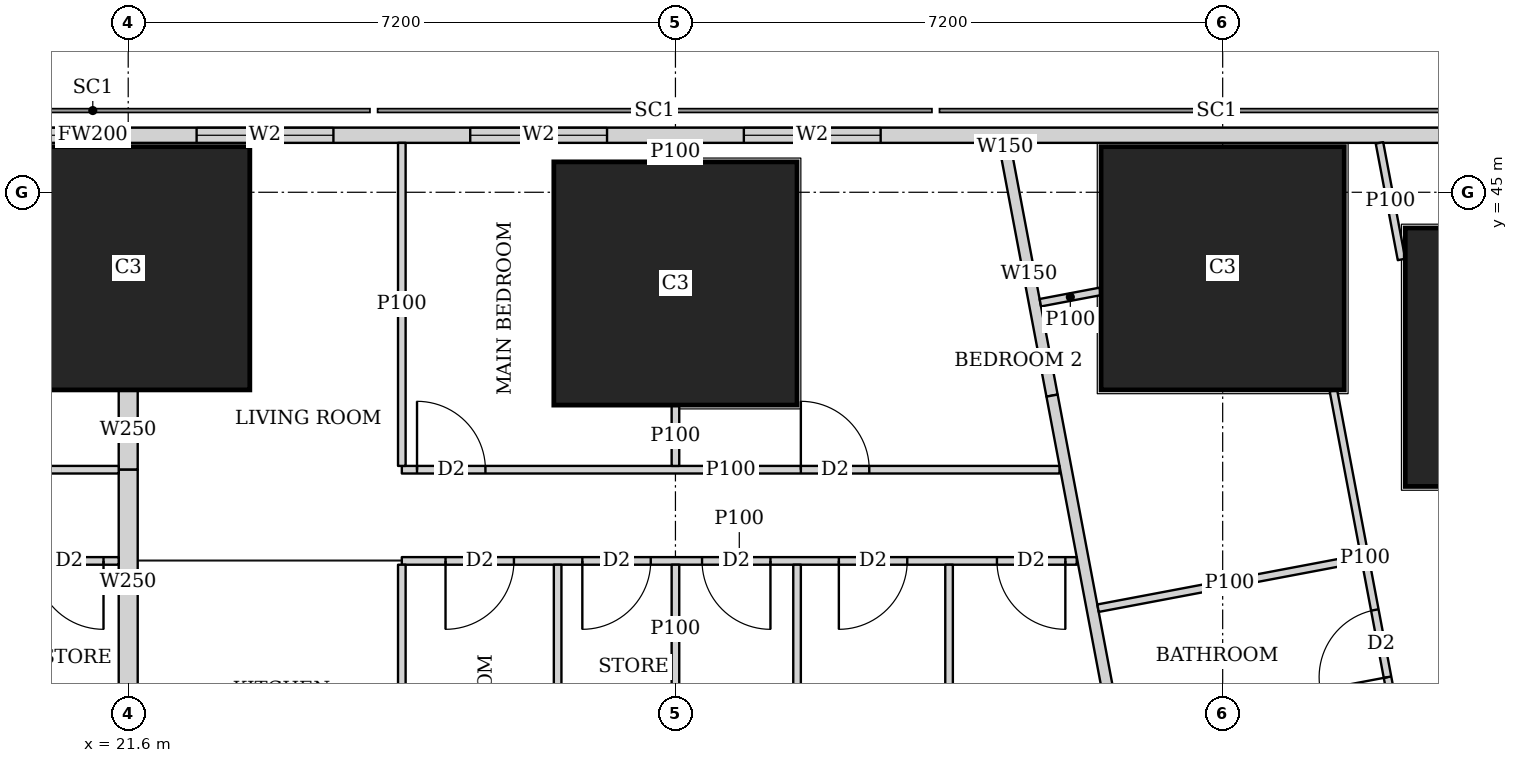
"""IFC4 building model, lengths in metres.
Left out: names, types, materials, properties, quantities, classifications, styles, units other than length and angle.
Written with IfcOpenShell. Run it as: python <this file> out.ifc"""

import sys

from ifc_helpers import new_model, si_unit, direction, frame, frame_2d, origin, origin_2d, place, context, subcontext, project, spatial, rectangle, extrude, element, fill, save


model = new_model("IFC4")
c1 = context("Model", 3, precision=1e-05, world=origin(), true_north=direction((0.0, 1.0)))
c2 = subcontext(c1, "Body", "Model", "MODEL_VIEW")
j1 = project(units=[si_unit("LENGTHUNIT", "METRE"), si_unit("PLANEANGLEUNIT", "RADIAN")], contexts=[c1])
p1 = place(None, origin())
s1 = spatial("IfcSite", under=j1, at=p1, CompositionType="ELEMENT")
p2 = place(p1, origin())
s2 = spatial("IfcBuilding", under=s1, at=p2, CompositionType="ELEMENT")
p3 = place(p2, frame((0.0, 0.0, 23.75)))
s3 = spatial("IfcBuildingStorey", under=s2, at=p3, CompositionType="ELEMENT", Elevation=23.75)
p4 = place(p3, frame((40.102, 42.83, 0.0), z_axis=(0.0, 0.0, 1.0), x_axis=(1.0, 0.0, 0.0)))
e1 = element("IfcColumn", 1, at=p4, inside=s3, PredefinedType="COLUMN", context=c2, shape_type="SweptSolid", body=[
    extrude(rectangle(XDim=3.4, YDim=3.4, at=origin_2d()), origin(), (0.0, 0.0, 1.0), 3.75),
])
for number, where, z_axis, x_axis in (
    (2, (21.6, 44.0, 0.0), (0.0, 0.0, 1.0), (1.0, 0.0, 0.0)),
    (3, (28.8, 43.8, 0.0), (0.0, 0.0, 1.0), (1.0, 0.0, 0.0)),
    (4, (36.0, 44.0, 0.0), (0.0, 0.0, 1.0), (1.0, 0.0, 0.0)),
):
    element("IfcColumn", number, at=place(p3, frame(where, z_axis=z_axis, x_axis=x_axis)), inside=s3, PredefinedType="COLUMN", context=c2, shape_type="SweptSolid", body=[
        extrude(rectangle(XDim=3.2, YDim=3.2, at=origin_2d()), origin(), (0.0, 0.0, 1.0), 3.75),
    ])
p5 = place(p3, frame((40.106, 45.75, 0.0), z_axis=(0.0, 0.0, 1.0), x_axis=(-1.0, 0.0, 0.0)))
e5 = element("IfcWall", 5, at=p5, inside=s3, PredefinedType="SOLIDWALL", context=c2, shape_type="SweptSolid", body=[
    extrude(rectangle(XDim=37.943, YDim=0.2, at=frame_2d((18.971, 0.0))), origin(), (0.0, 0.0, 1.0), 3.5),
])
p6 = place(p5, frame((8.606, 0.0, 0.9)))
e6 = element("IfcOpeningElement", 6, at=p6, cuts=e5, PredefinedType="OPENING", context=c2, shape_type="SweptSolid", body=[
    extrude(rectangle(XDim=1.8, YDim=1.5, at=frame_2d((0.9, 0.75))), frame((0.0, 0.11, 0.0), z_axis=(0.0, -1.0, 0.0), x_axis=(1.0, 0.0, 0.0)), (0.0, 0.0, 1.0), 0.22),
])
p7 = place(p5, frame((12.206, 0.0, 0.9)))
e7 = element("IfcOpeningElement", 7, at=p7, cuts=e5, PredefinedType="OPENING", context=c2, shape_type="SweptSolid", body=[
    extrude(rectangle(XDim=1.8, YDim=1.5, at=frame_2d((0.9, 0.75))), frame((0.0, 0.11, 0.0), z_axis=(0.0, -1.0, 0.0), x_axis=(1.0, 0.0, 0.0)), (0.0, 0.0, 1.0), 0.22),
])
p8 = place(p5, frame((15.806, 0.0, 0.9)))
e8 = element("IfcOpeningElement", 8, at=p8, cuts=e5, PredefinedType="OPENING", context=c2, shape_type="SweptSolid", body=[
    extrude(rectangle(XDim=1.8, YDim=1.5, at=frame_2d((0.9, 0.75))), frame((0.0, 0.11, 0.0), z_axis=(0.0, -1.0, 0.0), x_axis=(1.0, 0.0, 0.0)), (0.0, 0.0, 1.0), 0.22),
])
p9 = place(p5, frame((19.406, 0.0, 0.9)))
e9 = element("IfcOpeningElement", 9, at=p9, cuts=e5, PredefinedType="OPENING", context=c2, shape_type="SweptSolid", body=[
    extrude(rectangle(XDim=1.8, YDim=1.5, at=frame_2d((0.9, 0.75))), frame((0.0, 0.11, 0.0), z_axis=(0.0, -1.0, 0.0), x_axis=(1.0, 0.0, 0.0)), (0.0, 0.0, 1.0), 0.22),
])
p10 = place(p5, frame((23.006, 0.0, 0.9)))
e10 = element("IfcOpeningElement", 10, at=p10, cuts=e5, PredefinedType="OPENING", context=c2, shape_type="SweptSolid", body=[
    extrude(rectangle(XDim=1.8, YDim=1.5, at=frame_2d((0.9, 0.75))), frame((0.0, 0.11, 0.0), z_axis=(0.0, -1.0, 0.0), x_axis=(1.0, 0.0, 0.0)), (0.0, 0.0, 1.0), 0.22),
])
p11 = place(p5, frame((26.606, 0.0, 0.9)))
e11 = element("IfcOpeningElement", 11, at=p11, cuts=e5, PredefinedType="OPENING", context=c2, shape_type="SweptSolid", body=[
    extrude(rectangle(XDim=1.8, YDim=1.5, at=frame_2d((0.9, 0.75))), frame((0.0, 0.11, 0.0), z_axis=(0.0, -1.0, 0.0), x_axis=(1.0, 0.0, 0.0)), (0.0, 0.0, 1.0), 0.22),
])
p12 = place(p3, frame((33.127, 45.65, 0.0), z_axis=(0.0, 0.0, 1.0), x_axis=(0.184660164975, -0.98280243359, 0.0)))
e12 = element("IfcWall", 12, at=p12, inside=s3, PredefinedType="SOLIDWALL", context=c2, shape_type="SweptSolid", body=[
    extrude(rectangle(XDim=0.119, YDim=0.15, at=frame_2d((0.06, 0.0))), origin(), (0.0, 0.0, 1.0), 3.5),
])
p13 = place(p3, frame((33.149, 45.533, 0.0), z_axis=(0.0, 0.0, 1.0), x_axis=(0.185606774758, -0.98262410166, 0.0)))
e13 = element("IfcWall", 13, at=p13, inside=s3, PredefinedType="SOLIDWALL", context=c2, shape_type="SweptSolid", body=[
    extrude(rectangle(XDim=3.265, YDim=0.15, at=frame_2d((1.632, 0.0))), origin(), (0.0, 0.0, 1.0), 2.05),
])
p14 = place(p3, frame((33.755, 42.325, 0.0), z_axis=(0.0, 0.0, 1.0), x_axis=(0.185611461091, -0.982623216453, 0.0)))
e14 = element("IfcWall", 14, at=p14, inside=s3, PredefinedType="SOLIDWALL", context=c2, shape_type="SweptSolid", body=[
    extrude(rectangle(XDim=40.241, YDim=0.15, at=frame_2d((20.121, 0.0))), origin(), (0.0, 0.0, 1.0), 2.5),
])
p15 = place(p14, frame((7.325, 0.0, 0.0)))
e15 = element("IfcOpeningElement", 15, at=p15, cuts=e14, PredefinedType="OPENING", context=c2, shape_type="SweptSolid", body=[
    extrude(rectangle(XDim=1.0, YDim=2.1, at=frame_2d((0.5, 1.05))), frame((0.0, 0.085, 0.0), z_axis=(0.0, -1.0, 0.0), x_axis=(1.0, 0.0, 0.0)), (0.0, 0.0, 1.0), 0.17),
])
p16 = place(p14, frame((11.902, 0.0, 0.0)))
e16 = element("IfcOpeningElement", 16, at=p16, cuts=e14, PredefinedType="OPENING", context=c2, shape_type="SweptSolid", body=[
    extrude(rectangle(XDim=1.0, YDim=2.1, at=frame_2d((0.5, 1.05))), frame((0.0, 0.085, 0.0), z_axis=(0.0, -1.0, 0.0), x_axis=(1.0, 0.0, 0.0)), (0.0, 0.0, 1.0), 0.17),
])
p17 = place(p14, frame((25.718, 0.0, 0.0)))
e17 = element("IfcOpeningElement", 17, at=p17, cuts=e14, PredefinedType="OPENING", context=c2, shape_type="SweptSolid", body=[
    extrude(rectangle(XDim=1.0, YDim=2.1, at=frame_2d((0.5, 1.05))), frame((0.0, 0.085, 0.0), z_axis=(0.0, -1.0, 0.0), x_axis=(1.0, 0.0, 0.0)), (0.0, 0.0, 1.0), 0.17),
])
p18 = place(p14, frame((31.788, 0.0, 0.0)))
e18 = element("IfcOpeningElement", 18, at=p18, cuts=e14, PredefinedType="OPENING", context=c2, shape_type="SweptSolid", body=[
    extrude(rectangle(XDim=1.0, YDim=2.1, at=frame_2d((0.5, 1.05))), frame((0.0, 0.085, 0.0), z_axis=(0.0, -1.0, 0.0), x_axis=(1.0, 0.0, 0.0)), (0.0, 0.0, 1.0), 0.17),
])
p19 = place(p3, frame((38.063, 45.65, 0.0), z_axis=(0.0, 0.0, 1.0), x_axis=(0.185789650565, -0.982589540827, 0.0)))
e19 = element("IfcWall", 19, at=p19, inside=s3, PredefinedType="PARTITIONING", context=c2, shape_type="SweptSolid", body=[
    extrude(rectangle(XDim=1.561, YDim=0.1, at=frame_2d((0.781, 0.0))), origin(), (0.0, 0.0, 1.0), 3.5),
])
p20 = place(p3, frame((37.457, 42.39, 0.0), z_axis=(0.0, 0.0, 1.0), x_axis=(0.185560627322, -0.982632817276, 0.0)))
e20 = element("IfcWall", 20, at=p20, inside=s3, PredefinedType="PARTITIONING", context=c2, shape_type="SweptSolid", body=[
    extrude(rectangle(XDim=4.484, YDim=0.1, at=frame_2d((2.242, 0.0))), origin(), (0.0, 0.0, 1.0), 3.5),
])
p21 = place(p20, frame((2.936, 0.0, 0.0)))
e21 = element("IfcOpeningElement", 21, at=p21, cuts=e20, PredefinedType="OPENING", context=c2, shape_type="SweptSolid", body=[
    extrude(rectangle(XDim=0.9, YDim=2.1, at=frame_2d((0.45, 1.05))), frame((0.0, 0.06, 0.0), z_axis=(0.0, -1.0, 0.0), x_axis=(1.0, 0.0, 0.0)), (0.0, 0.0, 1.0), 0.12),
])
p22 = place(p3, frame((34.39, 43.696, 0.0), z_axis=(0.0, 0.0, 1.0), x_axis=(-0.982640737979, -0.185518678479, 0.0)))
e22 = element("IfcWall", 22, at=p22, inside=s3, PredefinedType="PARTITIONING", context=c2, shape_type="SweptSolid", body=[
    extrude(rectangle(XDim=0.803, YDim=0.1, at=frame_2d((0.401, 0.0))), origin(), (0.0, 0.0, 1.0), 2.05),
])
p23 = place(p3, frame((37.823, 40.182, 0.0), z_axis=(0.0, 0.0, 1.0), x_axis=(-0.98263926043, -0.185526504472, 0.0)))
e23 = element("IfcWall", 23, at=p23, inside=s3, PredefinedType="PARTITIONING", context=c2, shape_type="SweptSolid", body=[
    extrude(rectangle(XDim=3.524, YDim=0.1, at=frame_2d((1.762, 0.0))), origin(), (0.0, 0.0, 1.0), 3.5),
])
p24 = place(p3, frame((18.0, 41.35, 0.0), z_axis=(0.0, 0.0, 1.0), x_axis=(1.0, 0.0, 0.0)))
e24 = element("IfcWall", 24, at=p24, inside=s3, PredefinedType="PARTITIONING", context=c2, shape_type="SweptSolid", body=[
    extrude(rectangle(XDim=3.475, YDim=0.1, at=frame_2d((1.738, 0.0))), origin(), (0.0, 0.0, 1.0), 3.5),
])
p25 = place(p24, frame((0.2, 0.0, 0.0)))
e25 = element("IfcOpeningElement", 25, at=p25, cuts=e24, PredefinedType="OPENING", context=c2, shape_type="SweptSolid", body=[
    extrude(rectangle(XDim=0.9, YDim=2.1, at=frame_2d((0.45, 1.05))), frame((0.0, 0.06, 0.0), z_axis=(0.0, -1.0, 0.0), x_axis=(1.0, 0.0, 0.0)), (0.0, 0.0, 1.0), 0.12),
])
p26 = place(p3, frame((18.0, 40.15, 0.0), z_axis=(0.0, 0.0, 1.0), x_axis=(1.0, 0.0, 0.0)))
e26 = element("IfcWall", 26, at=p26, inside=s3, PredefinedType="PARTITIONING", context=c2, shape_type="SweptSolid", body=[
    extrude(rectangle(XDim=3.475, YDim=0.1, at=frame_2d((1.738, 0.0))), origin(), (0.0, 0.0, 1.0), 3.5),
])
p27 = place(p26, frame((0.575, 0.0, 0.0)))
e27 = element("IfcOpeningElement", 27, at=p27, cuts=e26, PredefinedType="OPENING", context=c2, shape_type="SweptSolid", body=[
    extrude(rectangle(XDim=0.9, YDim=2.1, at=frame_2d((0.45, 1.05))), frame((0.0, 0.06, 0.0), z_axis=(0.0, -1.0, 0.0), x_axis=(1.0, 0.0, 0.0)), (0.0, 0.0, 1.0), 0.12),
])
p28 = place(p26, frame((2.375, 0.0, 0.0)))
e28 = element("IfcOpeningElement", 28, at=p28, cuts=e26, PredefinedType="OPENING", context=c2, shape_type="SweptSolid", body=[
    extrude(rectangle(XDim=0.9, YDim=2.1, at=frame_2d((0.45, 1.05))), frame((0.0, 0.06, 0.0), z_axis=(0.0, -1.0, 0.0), x_axis=(1.0, 0.0, 0.0)), (0.0, 0.0, 1.0), 0.12),
])
p29 = place(p3, frame((25.2, 41.35, 0.0), z_axis=(0.0, 0.0, 1.0), x_axis=(1.0, 0.0, 0.0)))
e29 = element("IfcWall", 29, at=p29, inside=s3, PredefinedType="PARTITIONING", context=c2, shape_type="SweptSolid", body=[
    extrude(rectangle(XDim=8.653, YDim=0.1, at=frame_2d((4.327, 0.0))), origin(), (0.0, 0.0, 1.0), 3.5),
])
p30 = place(p29, frame((0.2, 0.0, 0.0)))
e30 = element("IfcOpeningElement", 30, at=p30, cuts=e29, PredefinedType="OPENING", context=c2, shape_type="SweptSolid", body=[
    extrude(rectangle(XDim=0.9, YDim=2.1, at=frame_2d((0.45, 1.05))), frame((0.0, 0.06, 0.0), z_axis=(0.0, -1.0, 0.0), x_axis=(1.0, 0.0, 0.0)), (0.0, 0.0, 1.0), 0.12),
])
p31 = place(p29, frame((5.25, 0.0, 0.0)))
e31 = element("IfcOpeningElement", 31, at=p31, cuts=e29, PredefinedType="OPENING", context=c2, shape_type="SweptSolid", body=[
    extrude(rectangle(XDim=0.9, YDim=2.1, at=frame_2d((0.45, 1.05))), frame((0.0, 0.06, 0.0), z_axis=(0.0, -1.0, 0.0), x_axis=(1.0, 0.0, 0.0)), (0.0, 0.0, 1.0), 0.12),
])
p32 = place(p3, frame((25.2, 40.15, 0.0), z_axis=(0.0, 0.0, 1.0), x_axis=(1.0, 0.0, 0.0)))
e32 = element("IfcWall", 32, at=p32, inside=s3, PredefinedType="PARTITIONING", context=c2, shape_type="SweptSolid", body=[
    extrude(rectangle(XDim=8.88, YDim=0.1, at=frame_2d((4.44, 0.0))), origin(), (0.0, 0.0, 1.0), 3.5),
])
p33 = place(p32, frame((0.575, 0.0, 0.0)))
e33 = element("IfcOpeningElement", 33, at=p33, cuts=e32, PredefinedType="OPENING", context=c2, shape_type="SweptSolid", body=[
    extrude(rectangle(XDim=0.9, YDim=2.1, at=frame_2d((0.45, 1.05))), frame((0.0, 0.06, 0.0), z_axis=(0.0, -1.0, 0.0), x_axis=(1.0, 0.0, 0.0)), (0.0, 0.0, 1.0), 0.12),
])
p34 = place(p32, frame((3.95, 0.0, 0.0)))
e34 = element("IfcOpeningElement", 34, at=p34, cuts=e32, PredefinedType="OPENING", context=c2, shape_type="SweptSolid", body=[
    extrude(rectangle(XDim=0.9, YDim=2.1, at=frame_2d((0.45, 1.05))), frame((0.0, 0.06, 0.0), z_axis=(0.0, -1.0, 0.0), x_axis=(1.0, 0.0, 0.0)), (0.0, 0.0, 1.0), 0.12),
])
p35 = place(p32, frame((7.83, 0.0, 0.0)))
e35 = element("IfcOpeningElement", 35, at=p35, cuts=e32, PredefinedType="OPENING", context=c2, shape_type="SweptSolid", body=[
    extrude(rectangle(XDim=0.9, YDim=2.1, at=frame_2d((0.45, 1.05))), frame((0.0, 0.06, 0.0), z_axis=(0.0, -1.0, 0.0), x_axis=(1.0, 0.0, 0.0)), (0.0, 0.0, 1.0), 0.12),
])
p36 = place(p32, frame((2.375, 0.0, 0.0)))
e36 = element("IfcOpeningElement", 36, at=p36, cuts=e32, PredefinedType="OPENING", context=c2, shape_type="SweptSolid", body=[
    extrude(rectangle(XDim=0.9, YDim=2.1, at=frame_2d((0.45, 1.05))), frame((0.0, 0.06, 0.0), z_axis=(0.0, -1.0, 0.0), x_axis=(1.0, 0.0, 0.0)), (0.0, 0.0, 1.0), 0.12),
])
p37 = place(p32, frame((5.75, 0.0, 0.0)))
e37 = element("IfcOpeningElement", 37, at=p37, cuts=e32, PredefinedType="OPENING", context=c2, shape_type="SweptSolid", body=[
    extrude(rectangle(XDim=0.9, YDim=2.1, at=frame_2d((0.45, 1.05))), frame((0.0, 0.06, 0.0), z_axis=(0.0, -1.0, 0.0), x_axis=(1.0, 0.0, 0.0)), (0.0, 0.0, 1.0), 0.12),
])
p38 = place(p3, frame((25.2, 41.4, 0.0), z_axis=(0.0, 0.0, 1.0), x_axis=(0.0, 1.0, 0.0)))
e38 = element("IfcWall", 38, at=p38, inside=s3, PredefinedType="PARTITIONING", context=c2, shape_type="SweptSolid", body=[
    extrude(rectangle(XDim=4.25, YDim=0.1, at=frame_2d((2.125, 0.0))), origin(), (0.0, 0.0, 1.0), 2.05),
])
p39 = place(p3, frame((28.8, 41.4, 0.0), z_axis=(0.0, 0.0, 1.0), x_axis=(0.0, 1.0, 0.0)))
e39 = element("IfcWall", 39, at=p39, inside=s3, PredefinedType="PARTITIONING", context=c2, shape_type="SweptSolid", body=[
    extrude(rectangle(XDim=0.799, YDim=0.1, at=frame_2d((0.399, 0.0))), origin(), (0.0, 0.0, 1.0), 3.5),
])
p40 = place(p3, frame((28.8, 45.401, 0.0), z_axis=(0.0, 0.0, 1.0), x_axis=(0.0, 1.0, 0.0)))
e40 = element("IfcWall", 40, at=p40, inside=s3, PredefinedType="PARTITIONING", context=c2, shape_type="SweptSolid", body=[
    extrude(rectangle(XDim=0.249, YDim=0.1, at=frame_2d((0.125, 0.0))), origin(), (0.0, 0.0, 1.0), 3.5),
])
p41 = place(p3, frame((25.2, 36.575, 0.0), z_axis=(0.0, 0.0, 1.0), x_axis=(0.0, 1.0, 0.0)))
e41 = element("IfcWall", 41, at=p41, inside=s3, PredefinedType="PARTITIONING", context=c2, shape_type="SweptSolid", body=[
    extrude(rectangle(XDim=3.525, YDim=0.1, at=frame_2d((1.763, 0.0))), origin(), (0.0, 0.0, 1.0), 3.5),
])
p42 = place(p3, frame((28.8, 38.401, 0.0), z_axis=(0.0, 0.0, 1.0), x_axis=(0.0, 1.0, 0.0)))
e42 = element("IfcWall", 42, at=p42, inside=s3, PredefinedType="PARTITIONING", context=c2, shape_type="SweptSolid", body=[
    extrude(rectangle(XDim=1.699, YDim=0.1, at=frame_2d((0.85, 0.0))), origin(), (0.0, 0.0, 1.0), 3.5),
])
for number, where, z_axis, x_axis in (
    (43, (32.4, 36.575, 0.0), (0.0, 0.0, 1.0), (0.0, 1.0, 0.0)),
    (44, (27.25, 36.575, 0.0), (0.0, 0.0, 1.0), (0.0, 1.0, 0.0)),
    (45, (30.4, 36.575, 0.0), (0.0, 0.0, 1.0), (0.0, 1.0, 0.0)),
):
    element("IfcWall", number, at=place(p3, frame(where, z_axis=z_axis, x_axis=x_axis)), inside=s3, PredefinedType="PARTITIONING", context=c2, shape_type="SweptSolid", body=[
        extrude(rectangle(XDim=3.525, YDim=0.1, at=frame_2d((1.763, 0.0))), origin(), (0.0, 0.0, 1.0), 3.5),
    ])
p43 = place(p3, frame((21.6, 41.35, 0.0), z_axis=(0.0, 0.0, 1.0), x_axis=(0.0, 1.0, 0.0)))
e46 = element("IfcWall", 46, at=p43, inside=s3, PredefinedType="SOLIDWALL", context=c2, shape_type="SweptSolid", body=[
    extrude(rectangle(XDim=1.049, YDim=0.25, at=frame_2d((0.524, 0.0))), origin(), (0.0, 0.0, 1.0), 2.05),
])
p44 = place(p3, frame((21.6, 38.401, 0.0), z_axis=(0.0, 0.0, 1.0), x_axis=(0.0, 1.0, 0.0)))
e47 = element("IfcWall", 47, at=p44, inside=s3, PredefinedType="SOLIDWALL", context=c2, shape_type="SweptSolid", body=[
    extrude(rectangle(XDim=2.949, YDim=0.25, at=frame_2d((1.475, 0.0))), origin(), (0.0, 0.0, 1.0), 3.5),
])
p45 = place(p6, origin())
e48 = element("IfcWindow", 48, at=p45, inside=s3, PartitioningType="SINGLE_PANEL", PredefinedType="WINDOW", context=c2, shape_type="SweptSolid", body=[
    extrude(rectangle(XDim=1.8, YDim=1.5, at=frame_2d((0.9, 0.75))), frame((0.0, 0.03, 0.0), z_axis=(0.0, -1.0, 0.0), x_axis=(1.0, 0.0, 0.0)), (0.0, 0.0, 1.0), 0.06),
])
fill(e6, e48)
p46 = place(p7, origin())
e49 = element("IfcWindow", 49, at=p46, inside=s3, PartitioningType="SINGLE_PANEL", PredefinedType="WINDOW", context=c2, shape_type="SweptSolid", body=[
    extrude(rectangle(XDim=1.8, YDim=1.5, at=frame_2d((0.9, 0.75))), frame((0.0, 0.03, 0.0), z_axis=(0.0, -1.0, 0.0), x_axis=(1.0, 0.0, 0.0)), (0.0, 0.0, 1.0), 0.06),
])
fill(e7, e49)
p47 = place(p8, origin())
e50 = element("IfcWindow", 50, at=p47, inside=s3, PartitioningType="SINGLE_PANEL", PredefinedType="WINDOW", context=c2, shape_type="SweptSolid", body=[
    extrude(rectangle(XDim=1.8, YDim=1.5, at=frame_2d((0.9, 0.75))), frame((0.0, 0.03, 0.0), z_axis=(0.0, -1.0, 0.0), x_axis=(1.0, 0.0, 0.0)), (0.0, 0.0, 1.0), 0.06),
])
fill(e8, e50)
p48 = place(p9, origin())
e51 = element("IfcWindow", 51, at=p48, inside=s3, PartitioningType="SINGLE_PANEL", PredefinedType="WINDOW", context=c2, shape_type="SweptSolid", body=[
    extrude(rectangle(XDim=1.8, YDim=1.5, at=frame_2d((0.9, 0.75))), frame((0.0, 0.03, 0.0), z_axis=(0.0, -1.0, 0.0), x_axis=(1.0, 0.0, 0.0)), (0.0, 0.0, 1.0), 0.06),
])
fill(e9, e51)
p49 = place(p21, origin())
e52 = element("IfcDoor", 52, at=p49, inside=s3, OperationType="SINGLE_SWING_LEFT", PredefinedType="DOOR", context=c2, shape_type="SweptSolid", body=[
    extrude(rectangle(XDim=0.9, YDim=2.1, at=frame_2d((0.45, 1.05))), frame((0.0, 0.025, 0.0), z_axis=(0.0, -1.0, 0.0), x_axis=(1.0, 0.0, 0.0)), (0.0, 0.0, 1.0), 0.05),
])
fill(e21, e52)
p50 = place(p28, origin())
e53 = element("IfcDoor", 53, at=p50, inside=s3, OperationType="SINGLE_SWING_LEFT", PredefinedType="DOOR", context=c2, shape_type="SweptSolid", body=[
    extrude(rectangle(XDim=0.9, YDim=2.1, at=frame_2d((0.45, 1.05))), frame((0.0, 0.025, 0.0), z_axis=(0.0, -1.0, 0.0), x_axis=(1.0, 0.0, 0.0)), (0.0, 0.0, 1.0), 0.05),
])
fill(e28, e53)
p51 = place(p30, origin())
e54 = element("IfcDoor", 54, at=p51, inside=s3, OperationType="SINGLE_SWING_LEFT", PredefinedType="DOOR", context=c2, shape_type="SweptSolid", body=[
    extrude(rectangle(XDim=0.9, YDim=2.1, at=frame_2d((0.45, 1.05))), frame((0.0, 0.025, 0.0), z_axis=(0.0, -1.0, 0.0), x_axis=(1.0, 0.0, 0.0)), (0.0, 0.0, 1.0), 0.05),
])
fill(e30, e54)
p52 = place(p31, origin())
e55 = element("IfcDoor", 55, at=p52, inside=s3, OperationType="SINGLE_SWING_LEFT", PredefinedType="DOOR", context=c2, shape_type="SweptSolid", body=[
    extrude(rectangle(XDim=0.9, YDim=2.1, at=frame_2d((0.45, 1.05))), frame((0.0, 0.025, 0.0), z_axis=(0.0, -1.0, 0.0), x_axis=(1.0, 0.0, 0.0)), (0.0, 0.0, 1.0), 0.05),
])
fill(e31, e55)
p53 = place(p33, origin())
e56 = element("IfcDoor", 56, at=p53, inside=s3, OperationType="SINGLE_SWING_RIGHT", PredefinedType="DOOR", context=c2, shape_type="SweptSolid", body=[
    extrude(rectangle(XDim=0.9, YDim=2.1, at=frame_2d((0.45, 1.05))), frame((0.0, 0.025, 0.0), z_axis=(0.0, -1.0, 0.0), x_axis=(1.0, 0.0, 0.0)), (0.0, 0.0, 1.0), 0.05),
])
fill(e33, e56)
p54 = place(p34, origin())
e57 = element("IfcDoor", 57, at=p54, inside=s3, OperationType="SINGLE_SWING_LEFT", PredefinedType="DOOR", context=c2, shape_type="SweptSolid", body=[
    extrude(rectangle(XDim=0.9, YDim=2.1, at=frame_2d((0.45, 1.05))), frame((0.0, 0.025, 0.0), z_axis=(0.0, -1.0, 0.0), x_axis=(1.0, 0.0, 0.0)), (0.0, 0.0, 1.0), 0.05),
])
fill(e34, e57)
p55 = place(p35, origin())
e58 = element("IfcDoor", 58, at=p55, inside=s3, OperationType="SINGLE_SWING_LEFT", PredefinedType="DOOR", context=c2, shape_type="SweptSolid", body=[
    extrude(rectangle(XDim=0.9, YDim=2.1, at=frame_2d((0.45, 1.05))), frame((0.0, 0.025, 0.0), z_axis=(0.0, -1.0, 0.0), x_axis=(1.0, 0.0, 0.0)), (0.0, 0.0, 1.0), 0.05),
])
fill(e35, e58)
p56 = place(p36, origin())
e59 = element("IfcDoor", 59, at=p56, inside=s3, OperationType="SINGLE_SWING_RIGHT", PredefinedType="DOOR", context=c2, shape_type="SweptSolid", body=[
    extrude(rectangle(XDim=0.9, YDim=2.1, at=frame_2d((0.45, 1.05))), frame((0.0, 0.025, 0.0), z_axis=(0.0, -1.0, 0.0), x_axis=(1.0, 0.0, 0.0)), (0.0, 0.0, 1.0), 0.05),
])
fill(e36, e59)
p57 = place(p37, origin())
e60 = element("IfcDoor", 60, at=p57, inside=s3, OperationType="SINGLE_SWING_RIGHT", PredefinedType="DOOR", context=c2, shape_type="SweptSolid", body=[
    extrude(rectangle(XDim=0.9, YDim=2.1, at=frame_2d((0.45, 1.05))), frame((0.0, 0.025, 0.0), z_axis=(0.0, -1.0, 0.0), x_axis=(1.0, 0.0, 0.0)), (0.0, 0.0, 1.0), 0.05),
])
fill(e37, e60)
save(model, sys.argv[1])
